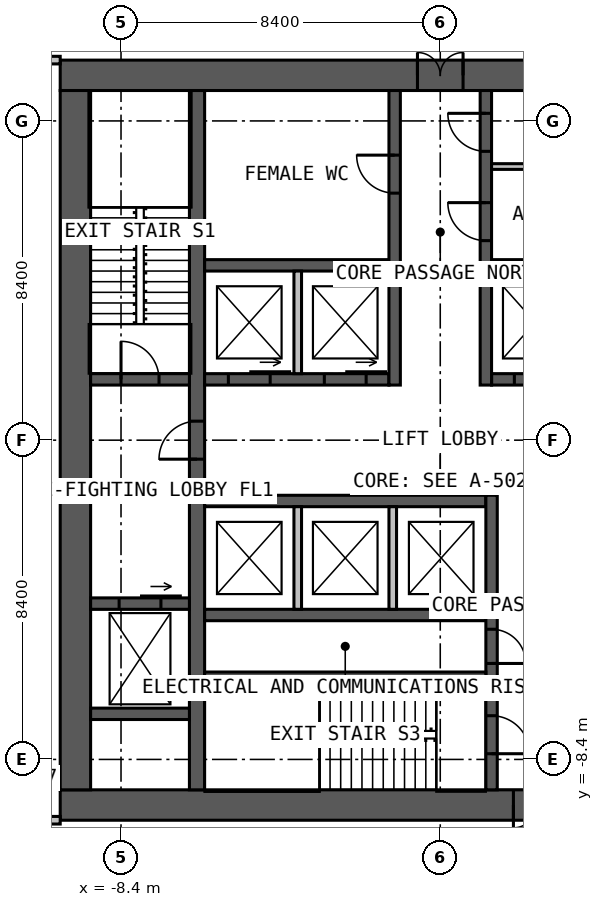
"""IFC4 building model, lengths in metres.
Left out: names, types, materials, properties, quantities, classifications, styles, units other than length and angle.
Written with IfcOpenShell. Run it as: python <this file> out.ifc"""

import sys

from ifc_helpers import new_model, si_unit, direction, frame, frame_2d, origin, place, context, subcontext, project, spatial, rectangle, extrude, element, fill, save


model = new_model("IFC4")
c1 = context("Model", 3, precision=1e-05, world=origin(), true_north=direction((0.0, 1.0)))
c2 = subcontext(c1, "Body", "Model", "MODEL_VIEW")
j1 = project(units=[si_unit("LENGTHUNIT", "METRE"), si_unit("PLANEANGLEUNIT", "RADIAN")], contexts=[c1])
p1 = place(None, origin())
s1 = spatial("IfcSite", under=j1, at=p1, CompositionType="ELEMENT")
p2 = place(p1, origin())
s2 = spatial("IfcBuilding", under=s1, at=p2, CompositionType="ELEMENT")
p3 = place(p2, frame((0.0, 0.0, 37.0)))
s3 = spatial("IfcBuildingStorey", under=s2, at=p3, CompositionType="ELEMENT", Elevation=37.0)
p4 = place(p3, frame((-10.0, 9.6, 0.0), z_axis=(0.0, 0.0, 1.0), x_axis=(1.0, 0.0, 0.0)))
e1 = element("IfcWall", 1, at=p4, inside=s3, PredefinedType="SOLIDWALL", context=c2, shape_type="SweptSolid", body=[
    extrude(rectangle(XDim=20.0, YDim=0.8, at=frame_2d((10.0, 0.0))), origin(), (0.0, 0.0, 1.0), 4.0),
])
p5 = place(p4, frame((9.4, 0.0, 0.0)))
e2 = element("IfcOpeningElement", 2, at=p5, cuts=e1, PredefinedType="OPENING", context=c2, shape_type="SweptSolid", body=[
    extrude(rectangle(XDim=1.2, YDim=2.2, at=frame_2d((0.6, 1.1))), frame((0.0, 0.41, 0.0), z_axis=(0.0, -1.0, 0.0), x_axis=(1.0, 0.0, 0.0)), (0.0, 0.0, 1.0), 0.82),
])
p6 = place(p3, frame((10.0, -9.6, 0.0), z_axis=(0.0, 0.0, 1.0), x_axis=(-1.0, 0.0, 0.0)))
e3 = element("IfcWall", 3, at=p6, inside=s3, PredefinedType="SOLIDWALL", context=c2, shape_type="SweptSolid", body=[
    extrude(rectangle(XDim=20.0, YDim=0.8, at=frame_2d((10.0, 0.0))), origin(), (0.0, 0.0, 1.0), 4.0),
])
p7 = place(p6, frame((6.875, 0.0, 0.0)))
e4 = element("IfcOpeningElement", 4, at=p7, cuts=e3, PredefinedType="OPENING", context=c2, shape_type="SweptSolid", body=[
    extrude(rectangle(XDim=1.2, YDim=2.2, at=frame_2d((0.6, 1.1))), frame((0.0, 0.41, 0.0), z_axis=(0.0, -1.0, 0.0), x_axis=(1.0, 0.0, 0.0)), (0.0, 0.0, 1.0), 0.82),
])
p8 = place(p3, frame((-9.6, 9.2, 0.0), z_axis=(0.0, 0.0, 1.0), x_axis=(0.0, -1.0, 0.0)))
e5 = element("IfcWall", 5, at=p8, inside=s3, PredefinedType="SOLIDWALL", context=c2, shape_type="SweptSolid", body=[
    extrude(rectangle(XDim=18.4, YDim=0.8, at=frame_2d((9.2, 0.0))), origin(), (0.0, 0.0, 1.0), 4.0),
])
p9 = place(p3, frame((-6.4, -9.2, 0.0), z_axis=(0.0, 0.0, 1.0), x_axis=(0.0, 1.0, 0.0)))
e6 = element("IfcWall", 6, at=p9, inside=s3, PredefinedType="SOLIDWALL", context=c2, shape_type="SweptSolid", body=[
    extrude(rectangle(XDim=18.4, YDim=0.4, at=frame_2d((9.2, 0.0))), origin(), (0.0, 0.0, 1.0), 4.0),
])
p10 = place(p9, frame((8.7, 0.0, 0.0)))
e7 = element("IfcOpeningElement", 7, at=p10, cuts=e6, PredefinedType="OPENING", context=c2, shape_type="SweptSolid", body=[
    extrude(rectangle(XDim=1.0, YDim=2.2, at=frame_2d((0.5, 1.1))), frame((0.0, 0.21, 0.0), z_axis=(0.0, -1.0, 0.0), x_axis=(1.0, 0.0, 0.0)), (0.0, 0.0, 1.0), 0.42),
])
p11 = place(p3, frame((-6.2, 1.6, 0.0), z_axis=(0.0, 0.0, 1.0), x_axis=(1.0, 0.0, 0.0)))
e8 = element("IfcWall", 8, at=p11, inside=s3, PredefinedType="SOLIDWALL", context=c2, shape_type="SweptSolid", body=[
    extrude(rectangle(XDim=4.85, YDim=0.3, at=frame_2d((2.425, 0.0))), origin(), (0.0, 0.0, 1.0), 4.0),
])
p12 = place(p11, frame((0.625, 0.0, 0.0)))
e9 = element("IfcOpeningElement", 9, at=p12, cuts=e8, PredefinedType="OPENING", context=c2, shape_type="SweptSolid", body=[
    extrude(rectangle(XDim=1.1, YDim=2.2, at=frame_2d((0.55, 1.1))), frame((0.0, 0.16, 0.0), z_axis=(0.0, -1.0, 0.0), x_axis=(1.0, 0.0, 0.0)), (0.0, 0.0, 1.0), 0.32),
])
p13 = place(p11, frame((3.15, 0.0, 0.0)))
e10 = element("IfcOpeningElement", 10, at=p13, cuts=e8, PredefinedType="OPENING", context=c2, shape_type="SweptSolid", body=[
    extrude(rectangle(XDim=1.1, YDim=2.2, at=frame_2d((0.55, 1.1))), frame((0.0, 0.16, 0.0), z_axis=(0.0, -1.0, 0.0), x_axis=(1.0, 0.0, 0.0)), (0.0, 0.0, 1.0), 0.32),
])
p14 = place(p3, frame((1.35, 1.6, 0.0), z_axis=(0.0, 0.0, 1.0), x_axis=(1.0, 0.0, 0.0)))
e11 = element("IfcWall", 11, at=p14, inside=s3, PredefinedType="SOLIDWALL", context=c2, shape_type="SweptSolid", body=[
    extrude(rectangle(XDim=4.85, YDim=0.3, at=frame_2d((2.425, 0.0))), origin(), (0.0, 0.0, 1.0), 4.0),
])
p15 = place(p14, frame((0.6, 0.0, 0.0)))
e12 = element("IfcOpeningElement", 12, at=p15, cuts=e11, PredefinedType="OPENING", context=c2, shape_type="SweptSolid", body=[
    extrude(rectangle(XDim=1.1, YDim=2.2, at=frame_2d((0.55, 1.1))), frame((0.0, 0.16, 0.0), z_axis=(0.0, -1.0, 0.0), x_axis=(1.0, 0.0, 0.0)), (0.0, 0.0, 1.0), 0.32),
])
p16 = place(p14, frame((3.125, 0.0, 0.0)))
e13 = element("IfcOpeningElement", 13, at=p16, cuts=e11, PredefinedType="OPENING", context=c2, shape_type="SweptSolid", body=[
    extrude(rectangle(XDim=1.1, YDim=2.2, at=frame_2d((0.55, 1.1))), frame((0.0, 0.16, 0.0), z_axis=(0.0, -1.0, 0.0), x_axis=(1.0, 0.0, 0.0)), (0.0, 0.0, 1.0), 0.32),
])
for number, where, z_axis, x_axis in (
    (14, (-6.2, 4.6, 0.0), (0.0, 0.0, 1.0), (1.0, 0.0, 0.0)),
    (15, (1.35, 4.6, 0.0), (0.0, 0.0, 1.0), (1.0, 0.0, 0.0)),
):
    element("IfcWall", number, at=place(p3, frame(where, z_axis=z_axis, x_axis=x_axis)), inside=s3, PredefinedType="SOLIDWALL", context=c2, shape_type="SweptSolid", body=[
        extrude(rectangle(XDim=4.85, YDim=0.3, at=frame_2d((2.425, 0.0))), origin(), (0.0, 0.0, 1.0), 4.0),
    ])
p17 = place(p3, frame((-1.2, 1.45, 0.0), z_axis=(0.0, 0.0, 1.0), x_axis=(0.0, 1.0, 0.0)))
e16 = element("IfcWall", 16, at=p17, inside=s3, PredefinedType="SOLIDWALL", context=c2, shape_type="SweptSolid", body=[
    extrude(rectangle(XDim=7.75, YDim=0.3, at=frame_2d((3.875, 0.0))), origin(), (0.0, 0.0, 1.0), 4.0),
])
p18 = place(p17, frame((5.05, 0.0, 0.0)))
e17 = element("IfcOpeningElement", 17, at=p18, cuts=e16, PredefinedType="OPENING", context=c2, shape_type="SweptSolid", body=[
    extrude(rectangle(XDim=1.0, YDim=2.2, at=frame_2d((0.5, 1.1))), frame((0.0, 0.16, 0.0), z_axis=(0.0, -1.0, 0.0), x_axis=(1.0, 0.0, 0.0)), (0.0, 0.0, 1.0), 0.32),
])
p19 = place(p3, frame((1.2, 1.45, 0.0), z_axis=(0.0, 0.0, 1.0), x_axis=(0.0, 1.0, 0.0)))
e18 = element("IfcWall", 18, at=p19, inside=s3, PredefinedType="SOLIDWALL", context=c2, shape_type="SweptSolid", body=[
    extrude(rectangle(XDim=7.75, YDim=0.3, at=frame_2d((3.875, 0.0))), origin(), (0.0, 0.0, 1.0), 4.0),
])
p20 = place(p19, frame((3.8, 0.0, 0.0)))
e19 = element("IfcOpeningElement", 19, at=p20, cuts=e18, PredefinedType="OPENING", context=c2, shape_type="SweptSolid", body=[
    extrude(rectangle(XDim=1.0, YDim=2.2, at=frame_2d((0.5, 1.1))), frame((0.0, 0.16, 0.0), z_axis=(0.0, -1.0, 0.0), x_axis=(1.0, 0.0, 0.0)), (0.0, 0.0, 1.0), 0.32),
])
p21 = place(p19, frame((6.15, 0.0, 0.0)))
e20 = element("IfcOpeningElement", 20, at=p21, cuts=e18, PredefinedType="OPENING", context=c2, shape_type="SweptSolid", body=[
    extrude(rectangle(XDim=1.0, YDim=2.2, at=frame_2d((0.5, 1.1))), frame((0.0, 0.16, 0.0), z_axis=(0.0, -1.0, 0.0), x_axis=(1.0, 0.0, 0.0)), (0.0, 0.0, 1.0), 0.32),
])
for number, where, z_axis, x_axis in (
    (21, (-6.2, -1.6, 0.0), (0.0, 0.0, 1.0), (1.0, 0.0, 0.0)),
    (22, (-6.2, -4.6, 0.0), (0.0, 0.0, 1.0), (1.0, 0.0, 0.0)),
):
    element("IfcWall", number, at=place(p3, frame(where, z_axis=z_axis, x_axis=x_axis)), inside=s3, PredefinedType="SOLIDWALL", context=c2, shape_type="SweptSolid", body=[
        extrude(rectangle(XDim=7.4, YDim=0.3, at=frame_2d((3.7, 0.0))), origin(), (0.0, 0.0, 1.0), 4.0),
    ])
p22 = place(p3, frame((1.35, -1.45, 0.0), z_axis=(0.0, 0.0, 1.0), x_axis=(0.0, -1.0, 0.0)))
e23 = element("IfcWall", 23, at=p22, inside=s3, PredefinedType="SOLIDWALL", context=c2, shape_type="SweptSolid", body=[
    extrude(rectangle(XDim=7.75, YDim=0.3, at=frame_2d((3.875, 0.0))), origin(), (0.0, 0.0, 1.0), 4.0),
])
p23 = place(p22, frame((5.8, 0.0, 0.0)))
e24 = element("IfcOpeningElement", 24, at=p23, cuts=e23, PredefinedType="OPENING", context=c2, shape_type="SweptSolid", body=[
    extrude(rectangle(XDim=1.0, YDim=2.2, at=frame_2d((0.5, 1.1))), frame((0.0, 0.16, 0.0), z_axis=(0.0, -1.0, 0.0), x_axis=(1.0, 0.0, 0.0)), (0.0, 0.0, 1.0), 0.32),
])
p24 = place(p22, frame((3.525, 0.0, 0.0)))
e25 = element("IfcOpeningElement", 25, at=p24, cuts=e23, PredefinedType="OPENING", context=c2, shape_type="SweptSolid", body=[
    extrude(rectangle(XDim=0.9, YDim=2.2, at=frame_2d((0.45, 1.1))), frame((0.0, 0.16, 0.0), z_axis=(0.0, -1.0, 0.0), x_axis=(1.0, 0.0, 0.0)), (0.0, 0.0, 1.0), 0.32),
])
p25 = place(p3, frame((-6.2, -6.2, 0.0), z_axis=(0.0, 0.0, 1.0), x_axis=(1.0, 0.0, 0.0)))
e26 = element("IfcWall", 26, at=p25, inside=s3, PredefinedType="SOLIDWALL", context=c2, shape_type="SweptSolid", body=[
    extrude(rectangle(XDim=7.4, YDim=0.2, at=frame_2d((3.7, 0.0))), origin(), (0.0, 0.0, 1.0), 4.0),
])
p26 = place(p3, frame((-9.2, 1.6, 0.0), z_axis=(0.0, 0.0, 1.0), x_axis=(1.0, 0.0, 0.0)))
e27 = element("IfcWall", 27, at=p26, inside=s3, PredefinedType="SOLIDWALL", context=c2, shape_type="SweptSolid", body=[
    extrude(rectangle(XDim=2.6, YDim=0.3, at=frame_2d((1.3, 0.0))), origin(), (0.0, 0.0, 1.0), 4.0),
])
p27 = place(p26, frame((0.8, 0.0, 0.0)))
e28 = element("IfcOpeningElement", 28, at=p27, cuts=e27, PredefinedType="OPENING", context=c2, shape_type="SweptSolid", body=[
    extrude(rectangle(XDim=1.0, YDim=2.2, at=frame_2d((0.5, 1.1))), frame((0.0, 0.16, 0.0), z_axis=(0.0, -1.0, 0.0), x_axis=(1.0, 0.0, 0.0)), (0.0, 0.0, 1.0), 0.32),
])
p28 = place(p3, frame((-9.2, -4.3, 0.0), z_axis=(0.0, 0.0, 1.0), x_axis=(1.0, 0.0, 0.0)))
e29 = element("IfcWall", 29, at=p28, inside=s3, PredefinedType="SOLIDWALL", context=c2, shape_type="SweptSolid", body=[
    extrude(rectangle(XDim=2.6, YDim=0.3, at=frame_2d((1.3, 0.0))), origin(), (0.0, 0.0, 1.0), 4.0),
])
p29 = place(p28, frame((0.75, 0.0, 0.0)))
e30 = element("IfcOpeningElement", 30, at=p29, cuts=e29, PredefinedType="OPENING", context=c2, shape_type="SweptSolid", body=[
    extrude(rectangle(XDim=1.1, YDim=2.2, at=frame_2d((0.55, 1.1))), frame((0.0, 0.16, 0.0), z_axis=(0.0, -1.0, 0.0), x_axis=(1.0, 0.0, 0.0)), (0.0, 0.0, 1.0), 0.32),
])
p30 = place(p3, frame((-9.2, -7.2, 0.0), z_axis=(0.0, 0.0, 1.0), x_axis=(1.0, 0.0, 0.0)))
e31 = element("IfcWall", 31, at=p30, inside=s3, PredefinedType="SOLIDWALL", context=c2, shape_type="SweptSolid", body=[
    extrude(rectangle(XDim=2.6, YDim=0.3, at=frame_2d((1.3, 0.0))), origin(), (0.0, 0.0, 1.0), 4.0),
])
for number, where, z_axis, x_axis in (
    (32, (-3.75, 1.75, 0.0), (0.0, 0.0, 1.0), (0.0, 1.0, 0.0)),
    (33, (-3.75, -1.75, 0.0), (0.0, 0.0, 1.0), (0.0, -1.0, 0.0)),
    (34, (-1.25, -1.75, 0.0), (0.0, 0.0, 1.0), (0.0, -1.0, 0.0)),
):
    element("IfcWall", number, at=place(p3, frame(where, z_axis=z_axis, x_axis=x_axis)), inside=s3, PredefinedType="SOLIDWALL", context=c2, shape_type="SweptSolid", body=[
        extrude(rectangle(XDim=2.7, YDim=0.2, at=frame_2d((1.35, 0.0))), origin(), (0.0, 0.0, 1.0), 3.75),
    ])
p31 = place(p3, frame((1.35, 7.2, 0.0), z_axis=(0.0, 0.0, 1.0), x_axis=(1.0, 0.0, 0.0)))
e35 = element("IfcWall", 35, at=p31, inside=s3, PredefinedType="PARTITIONING", context=c2, shape_type="SweptSolid", body=[
    extrude(rectangle(XDim=4.85, YDim=0.15, at=frame_2d((2.425, 0.0))), origin(), (0.0, 0.0, 1.0), 3.75),
])
p32 = place(p31, frame((3.45, 0.0, 0.0)))
e36 = element("IfcOpeningElement", 36, at=p32, cuts=e35, PredefinedType="OPENING", context=c2, shape_type="SweptSolid", body=[
    extrude(rectangle(XDim=0.9, YDim=2.2, at=frame_2d((0.45, 1.1))), frame((0.0, 0.085, 0.0), z_axis=(0.0, -1.0, 0.0), x_axis=(1.0, 0.0, 0.0)), (0.0, 0.0, 1.0), 0.17),
])
p33 = place(p3, frame((-10.0, -10.0, 0.0), z_axis=(0.0, 0.0, 1.0), x_axis=(-1.0, 0.0, 0.0)))
e37 = element("IfcWall", 37, at=p33, inside=s3, PredefinedType="PARTITIONING", context=c2, shape_type="SweptSolid", body=[
    extrude(rectangle(XDim=2.0, YDim=0.2, at=frame_2d((1.0, 0.0))), origin(), (0.0, 0.0, 1.0), 3.8),
])
p34 = place(p33, frame((0.5, 0.0, 0.0)))
e38 = element("IfcOpeningElement", 38, at=p34, cuts=e37, PredefinedType="OPENING", context=c2, shape_type="SweptSolid", body=[
    extrude(rectangle(XDim=1.0, YDim=2.2, at=frame_2d((0.5, 1.1))), frame((0.0, 0.11, 0.0), z_axis=(0.0, -1.0, 0.0), x_axis=(1.0, 0.0, 0.0)), (0.0, 0.0, 1.0), 0.22),
])
p35 = place(p3, frame((-10.0, 10.0, 0.0), z_axis=(0.0, 0.0, 1.0), x_axis=(-1.0, 0.0, 0.0)))
e39 = element("IfcWall", 39, at=p35, inside=s3, PredefinedType="PARTITIONING", context=c2, shape_type="SweptSolid", body=[
    extrude(rectangle(XDim=2.0, YDim=0.2, at=frame_2d((1.0, 0.0))), origin(), (0.0, 0.0, 1.0), 3.8),
])
p36 = place(p35, frame((0.5, 0.0, 0.0)))
e40 = element("IfcOpeningElement", 40, at=p36, cuts=e39, PredefinedType="OPENING", context=c2, shape_type="SweptSolid", body=[
    extrude(rectangle(XDim=1.0, YDim=2.2, at=frame_2d((0.5, 1.1))), frame((0.0, 0.11, 0.0), z_axis=(0.0, -1.0, 0.0), x_axis=(1.0, 0.0, 0.0)), (0.0, 0.0, 1.0), 0.22),
])
p37 = place(p5, origin())
e41 = element("IfcDoor", 41, at=p37, inside=s3, OperationType="DOUBLE_DOOR_SINGLE_SWING", PredefinedType="DOOR", context=c2, shape_type="SweptSolid", body=[
    extrude(rectangle(XDim=1.2, YDim=2.2, at=frame_2d((0.6, 1.1))), frame((0.0, 0.025, 0.0), z_axis=(0.0, -1.0, 0.0), x_axis=(1.0, 0.0, 0.0)), (0.0, 0.0, 1.0), 0.05),
])
fill(e2, e41)
p38 = place(p7, origin())
e42 = element("IfcDoor", 42, at=p38, inside=s3, OperationType="DOUBLE_DOOR_SINGLE_SWING", PredefinedType="DOOR", context=c2, shape_type="SweptSolid", body=[
    extrude(rectangle(XDim=1.2, YDim=2.2, at=frame_2d((0.6, 1.1))), frame((0.0, 0.025, 0.0), z_axis=(0.0, -1.0, 0.0), x_axis=(1.0, 0.0, 0.0)), (0.0, 0.0, 1.0), 0.05),
])
fill(e4, e42)
p39 = place(p10, origin())
e43 = element("IfcDoor", 43, at=p39, inside=s3, OperationType="SINGLE_SWING_LEFT", PredefinedType="DOOR", context=c2, shape_type="SweptSolid", body=[
    extrude(rectangle(XDim=1.0, YDim=2.2, at=frame_2d((0.5, 1.1))), frame((0.0, 0.025, 0.0), z_axis=(0.0, -1.0, 0.0), x_axis=(1.0, 0.0, 0.0)), (0.0, 0.0, 1.0), 0.05),
])
fill(e7, e43)
p40 = place(p27, origin())
e44 = element("IfcDoor", 44, at=p40, inside=s3, OperationType="SINGLE_SWING_LEFT", PredefinedType="DOOR", context=c2, shape_type="SweptSolid", body=[
    extrude(rectangle(XDim=1.0, YDim=2.2, at=frame_2d((0.5, 1.1))), frame((0.0, 0.025, 0.0), z_axis=(0.0, -1.0, 0.0), x_axis=(1.0, 0.0, 0.0)), (0.0, 0.0, 1.0), 0.05),
])
fill(e28, e44)
p41 = place(p23, origin())
e45 = element("IfcDoor", 45, at=p41, inside=s3, OperationType="SINGLE_SWING_RIGHT", PredefinedType="DOOR", context=c2, shape_type="SweptSolid", body=[
    extrude(rectangle(XDim=1.0, YDim=2.2, at=frame_2d((0.5, 1.1))), frame((0.0, 0.025, 0.0), z_axis=(0.0, -1.0, 0.0), x_axis=(1.0, 0.0, 0.0)), (0.0, 0.0, 1.0), 0.05),
])
fill(e24, e45)
p42 = place(p18, origin())
e46 = element("IfcDoor", 46, at=p42, inside=s3, OperationType="SINGLE_SWING_RIGHT", PredefinedType="DOOR", context=c2, shape_type="SweptSolid", body=[
    extrude(rectangle(XDim=1.0, YDim=2.2, at=frame_2d((0.5, 1.1))), frame((0.0, 0.025, 0.0), z_axis=(0.0, -1.0, 0.0), x_axis=(1.0, 0.0, 0.0)), (0.0, 0.0, 1.0), 0.05),
])
fill(e17, e46)
p43 = place(p20, origin())
e47 = element("IfcDoor", 47, at=p43, inside=s3, OperationType="SINGLE_SWING_RIGHT", PredefinedType="DOOR", context=c2, shape_type="SweptSolid", body=[
    extrude(rectangle(XDim=1.0, YDim=2.2, at=frame_2d((0.5, 1.1))), frame((0.0, 0.025, 0.0), z_axis=(0.0, -1.0, 0.0), x_axis=(1.0, 0.0, 0.0)), (0.0, 0.0, 1.0), 0.05),
])
fill(e19, e47)
p44 = place(p21, origin())
e48 = element("IfcDoor", 48, at=p44, inside=s3, OperationType="SINGLE_SWING_RIGHT", PredefinedType="DOOR", context=c2, shape_type="SweptSolid", body=[
    extrude(rectangle(XDim=1.0, YDim=2.2, at=frame_2d((0.5, 1.1))), frame((0.0, 0.025, 0.0), z_axis=(0.0, -1.0, 0.0), x_axis=(1.0, 0.0, 0.0)), (0.0, 0.0, 1.0), 0.05),
])
fill(e20, e48)
p45 = place(p24, origin())
e49 = element("IfcDoor", 49, at=p45, inside=s3, OperationType="SINGLE_SWING_RIGHT", PredefinedType="DOOR", context=c2, shape_type="SweptSolid", body=[
    extrude(rectangle(XDim=0.9, YDim=2.2, at=frame_2d((0.45, 1.1))), frame((0.0, 0.025, 0.0), z_axis=(0.0, -1.0, 0.0), x_axis=(1.0, 0.0, 0.0)), (0.0, 0.0, 1.0), 0.05),
])
fill(e25, e49)
p46 = place(p12, origin())
e50 = element("IfcDoor", 50, at=p46, inside=s3, OperationType="SLIDING_TO_LEFT", PredefinedType="DOOR", context=c2, shape_type="SweptSolid", body=[
    extrude(rectangle(XDim=1.1, YDim=2.2, at=frame_2d((0.55, 1.1))), frame((0.0, 0.025, 0.0), z_axis=(0.0, -1.0, 0.0), x_axis=(1.0, 0.0, 0.0)), (0.0, 0.0, 1.0), 0.05),
])
fill(e9, e50)
p47 = place(p13, origin())
e51 = element("IfcDoor", 51, at=p47, inside=s3, OperationType="SLIDING_TO_LEFT", PredefinedType="DOOR", context=c2, shape_type="SweptSolid", body=[
    extrude(rectangle(XDim=1.1, YDim=2.2, at=frame_2d((0.55, 1.1))), frame((0.0, 0.025, 0.0), z_axis=(0.0, -1.0, 0.0), x_axis=(1.0, 0.0, 0.0)), (0.0, 0.0, 1.0), 0.05),
])
fill(e10, e51)
p48 = place(p15, origin())
e52 = element("IfcDoor", 52, at=p48, inside=s3, OperationType="SLIDING_TO_LEFT", PredefinedType="DOOR", context=c2, shape_type="SweptSolid", body=[
    extrude(rectangle(XDim=1.1, YDim=2.2, at=frame_2d((0.55, 1.1))), frame((0.0, 0.025, 0.0), z_axis=(0.0, -1.0, 0.0), x_axis=(1.0, 0.0, 0.0)), (0.0, 0.0, 1.0), 0.05),
])
fill(e12, e52)
p49 = place(p29, origin())
e53 = element("IfcDoor", 53, at=p49, inside=s3, OperationType="SLIDING_TO_LEFT", PredefinedType="DOOR", context=c2, shape_type="SweptSolid", body=[
    extrude(rectangle(XDim=1.1, YDim=2.2, at=frame_2d((0.55, 1.1))), frame((0.0, 0.025, 0.0), z_axis=(0.0, -1.0, 0.0), x_axis=(1.0, 0.0, 0.0)), (0.0, 0.0, 1.0), 0.05),
])
fill(e30, e53)
save(model, sys.argv[1])
